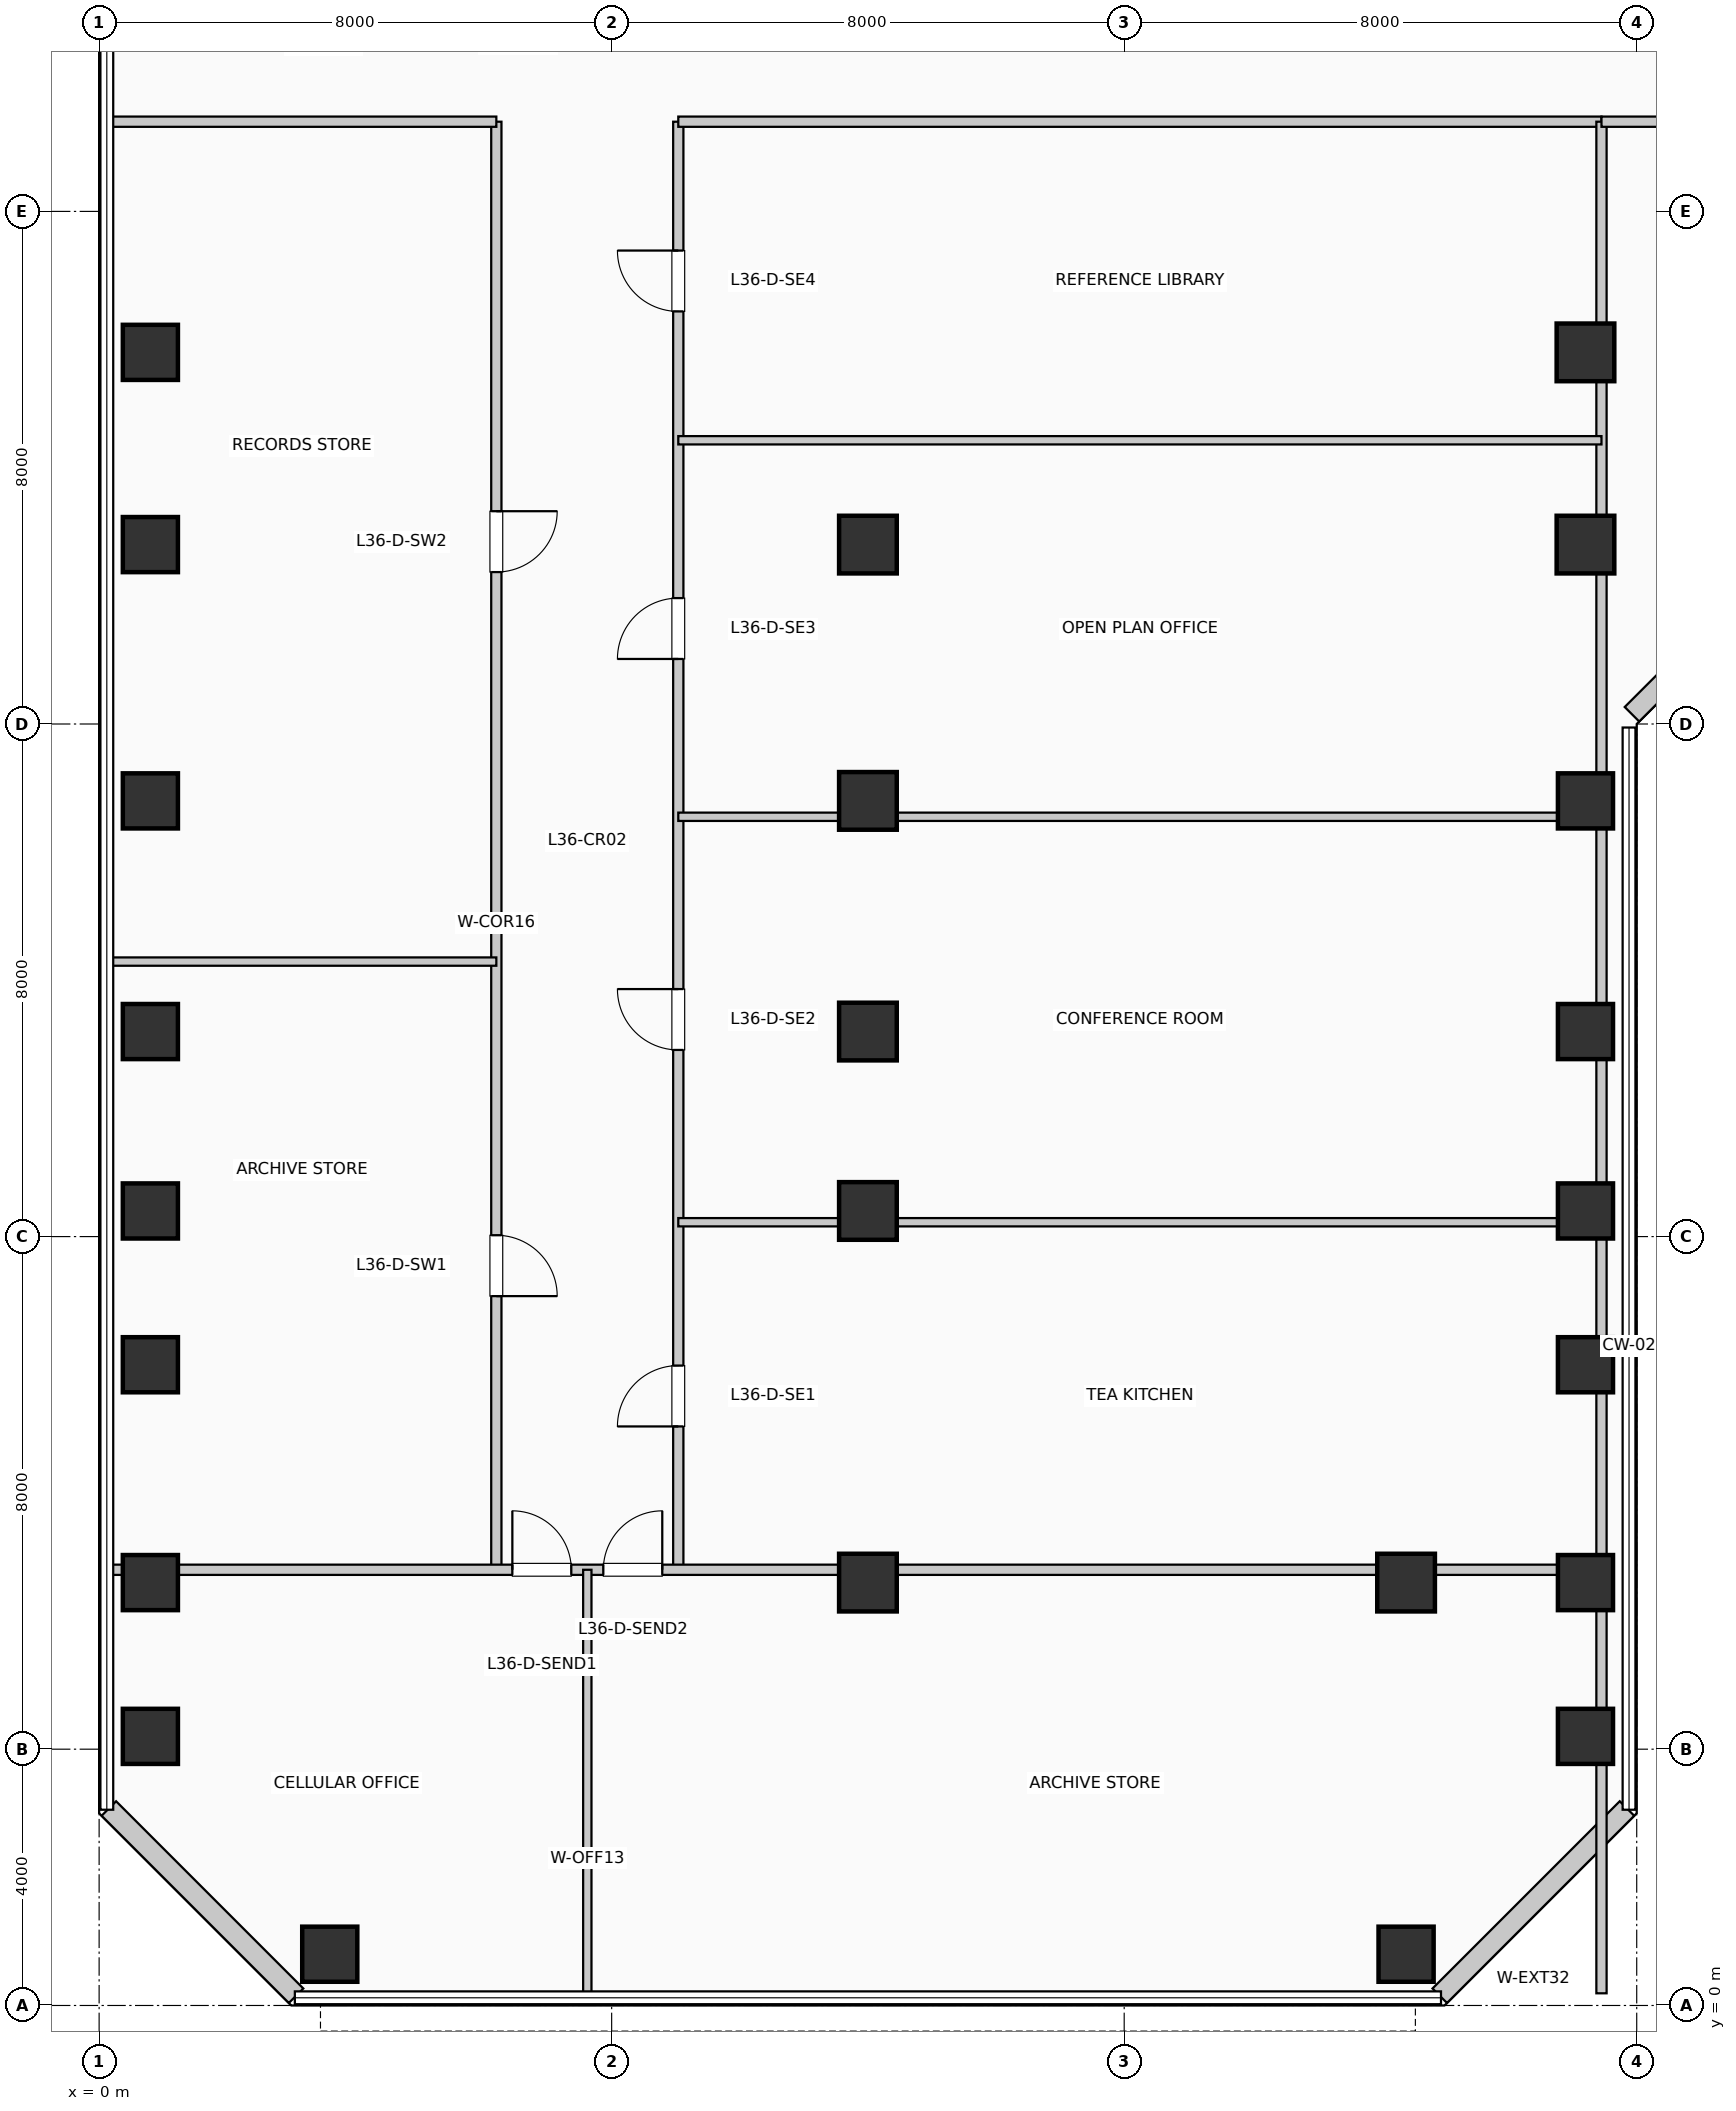
"""IFC4 building model, lengths in metres.
Left out: names, types, materials, properties, quantities, classifications, styles, units other than length and angle.
Written with IfcOpenShell. Run it as: python <this file> out.ifc"""

import sys

from ifc_helpers import new_model, si_unit, direction, frame, frame_2d, origin, origin_2d, place, context, subcontext, project, spatial, rectangle, extrude, element, fill, save


model = new_model("IFC4")
c1 = context("Model", 3, precision=1e-05, world=origin(), true_north=direction((0.0, 1.0)))
c2 = subcontext(c1, "Body", "Model", "MODEL_VIEW")
j1 = project(units=[si_unit("LENGTHUNIT", "METRE"), si_unit("PLANEANGLEUNIT", "RADIAN")], contexts=[c1])
p1 = place(None, origin())
s1 = spatial("IfcSite", under=j1, at=p1, CompositionType="ELEMENT")
p2 = place(p1, origin())
s2 = spatial("IfcBuilding", under=s1, at=p2, CompositionType="ELEMENT")
p3 = place(p2, frame((0.0, 0.0, 150.81)))
s3 = spatial("IfcBuildingStorey", under=s2, at=p3, CompositionType="ELEMENT", Elevation=150.81)
for number, where, z_axis, x_axis in (
    (1, (0.8, 4.2, 0.0), (0.0, 0.0, 1.0), (1.0, 0.0, 0.0)),
    (2, (0.8, 6.6, 0.0), (0.0, 0.0, 1.0), (1.0, 0.0, 0.0)),
    (3, (0.8, 10.0, 0.0), (0.0, 0.0, 1.0), (1.0, 0.0, 0.0)),
    (4, (0.8, 12.4, 0.0), (0.0, 0.0, 1.0), (1.0, 0.0, 0.0)),
    (5, (0.8, 15.2, 0.0), (0.0, 0.0, 1.0), (1.0, 0.0, 0.0)),
    (6, (0.8, 18.8, 0.0), (0.0, 0.0, 1.0), (1.0, 0.0, 0.0)),
    (7, (0.8, 22.8, 0.0), (0.0, 0.0, 1.0), (1.0, 0.0, 0.0)),
    (8, (0.8, 25.8, 0.0), (0.0, 0.0, 1.0), (1.0, 0.0, 0.0)),
    (9, (3.6, 0.8, 0.0), (0.0, 0.0, 1.0), (1.0, 0.0, 0.0)),
):
    element("IfcColumn", number, at=place(p3, frame(where, z_axis=z_axis, x_axis=x_axis)), inside=s3, PredefinedType="COLUMN", context=c2, shape_type="SweptSolid", body=[
        extrude(rectangle(XDim=0.86, YDim=0.86, at=origin_2d()), origin(), (0.0, 0.0, 1.0), 3.96),
    ])
for number, where, z_axis, x_axis in (
    (10, (12.0, 6.6, 0.0), (0.0, 0.0, 1.0), (1.0, 0.0, 0.0)),
    (11, (12.0, 12.4, 0.0), (0.0, 0.0, 1.0), (1.0, 0.0, 0.0)),
    (12, (12.0, 15.2, 0.0), (0.0, 0.0, 1.0), (1.0, 0.0, 0.0)),
    (13, (12.0, 18.8, 0.0), (0.0, 0.0, 1.0), (1.0, 0.0, 0.0)),
    (14, (12.0, 22.8, 0.0), (0.0, 0.0, 1.0), (1.0, 0.0, 0.0)),
):
    element("IfcColumn", number, at=place(p3, frame(where, z_axis=z_axis, x_axis=x_axis)), inside=s3, PredefinedType="COLUMN", context=c2, shape_type="SweptSolid", body=[
        extrude(rectangle(XDim=0.9, YDim=0.9, at=origin_2d()), origin(), (0.0, 0.0, 1.0), 3.96),
    ])
p4 = place(p3, frame((20.4, 0.8, 0.0), z_axis=(0.0, 0.0, 1.0), x_axis=(1.0, 0.0, 0.0)))
e15 = element("IfcColumn", 15, at=p4, inside=s3, PredefinedType="COLUMN", context=c2, shape_type="SweptSolid", body=[
    extrude(rectangle(XDim=0.86, YDim=0.86, at=origin_2d()), origin(), (0.0, 0.0, 1.0), 3.96),
])
p5 = place(p3, frame((20.4, 6.6, 0.0), z_axis=(0.0, 0.0, 1.0), x_axis=(1.0, 0.0, 0.0)))
e16 = element("IfcColumn", 16, at=p5, inside=s3, PredefinedType="COLUMN", context=c2, shape_type="SweptSolid", body=[
    extrude(rectangle(XDim=0.9, YDim=0.9, at=origin_2d()), origin(), (0.0, 0.0, 1.0), 3.96),
])
for number, where, z_axis, x_axis in (
    (17, (23.2, 4.2, 0.0), (0.0, 0.0, 1.0), (1.0, 0.0, 0.0)),
    (18, (23.2, 6.6, 0.0), (0.0, 0.0, 1.0), (1.0, 0.0, 0.0)),
    (19, (23.2, 10.0, 0.0), (0.0, 0.0, 1.0), (1.0, 0.0, 0.0)),
    (20, (23.2, 12.4, 0.0), (0.0, 0.0, 1.0), (1.0, 0.0, 0.0)),
    (21, (23.2, 15.2, 0.0), (0.0, 0.0, 1.0), (1.0, 0.0, 0.0)),
    (22, (23.2, 18.8, 0.0), (0.0, 0.0, 1.0), (1.0, 0.0, 0.0)),
):
    element("IfcColumn", number, at=place(p3, frame(where, z_axis=z_axis, x_axis=x_axis)), inside=s3, PredefinedType="COLUMN", context=c2, shape_type="SweptSolid", body=[
        extrude(rectangle(XDim=0.86, YDim=0.86, at=origin_2d()), origin(), (0.0, 0.0, 1.0), 3.96),
    ])
for number, where, z_axis, x_axis in (
    (23, (23.2, 22.8, 0.0), (0.0, 0.0, 1.0), (1.0, 0.0, 0.0)),
    (24, (23.2, 25.8, 0.0), (0.0, 0.0, 1.0), (1.0, 0.0, 0.0)),
):
    element("IfcColumn", number, at=place(p3, frame(where, z_axis=z_axis, x_axis=x_axis)), inside=s3, PredefinedType="COLUMN", context=c2, shape_type="SweptSolid", body=[
        extrude(rectangle(XDim=0.9, YDim=0.9, at=origin_2d()), origin(), (0.0, 0.0, 1.0), 3.96),
    ])
p6 = place(p3, frame((20.926, 0.152, 0.0), z_axis=(0.0, 0.0, 1.0), x_axis=(0.707106781187, 0.707106781187, 0.0)))
e25 = element("IfcWall", 25, at=p6, inside=s3, PredefinedType="SOLIDWALL", context=c2, shape_type="SweptSolid", body=[
    extrude(rectangle(XDim=4.133, YDim=0.32, at=frame_2d((2.066, 0.0))), origin(), (0.0, 0.0, 1.0), 3.71),
])
p7 = place(p3, frame((23.926, 20.152, 0.0), z_axis=(0.0, 0.0, 1.0), x_axis=(0.707106781187, 0.707106781187, 0.0)))
e26 = element("IfcWall", 26, at=p7, inside=s3, PredefinedType="SOLIDWALL", context=c2, shape_type="SweptSolid", body=[
    extrude(rectangle(XDim=2.718, YDim=0.32, at=frame_2d((1.359, 0.0))), origin(), (0.0, 0.0, 1.0), 3.71),
])
p8 = place(p3, frame((0.152, 3.074, 0.0), z_axis=(0.0, 0.0, 1.0), x_axis=(0.707106781187, -0.707106781187, 0.0)))
e27 = element("IfcWall", 27, at=p8, inside=s3, PredefinedType="SOLIDWALL", context=c2, shape_type="SweptSolid", body=[
    extrude(rectangle(XDim=4.133, YDim=0.32, at=frame_2d((2.066, 0.0))), origin(), (0.0, 0.0, 1.0), 3.71),
])
p9 = place(p3, frame((6.2, 6.8, 0.0), z_axis=(0.0, 0.0, 1.0), x_axis=(0.0, 1.0, 0.0)))
e28 = element("IfcWall", 28, at=p9, inside=s3, PredefinedType="PARTITIONING", context=c2, shape_type="SweptSolid", body=[
    extrude(rectangle(XDim=22.6, YDim=0.16, at=frame_2d((11.3, 0.0))), origin(), (0.0, 0.0, 1.0), 3.71),
])
p10 = place(p9, frame((5.221, 0.0, 0.0), z_axis=(0.0, 0.0, 1.0), x_axis=(-1.0, 0.0, 0.0)))
e29 = element("IfcOpeningElement", 29, at=p10, cuts=e28, PredefinedType="OPENING", context=c2, shape_type="SweptSolid", body=[
    extrude(rectangle(XDim=0.95, YDim=2.15, at=frame_2d((0.475, 1.075))), frame((0.0, 0.09, 0.0), z_axis=(0.0, -1.0, 0.0), x_axis=(1.0, 0.0, 0.0)), (0.0, 0.0, 1.0), 0.18),
])
p11 = place(p9, frame((16.521, 0.0, 0.0), z_axis=(0.0, 0.0, 1.0), x_axis=(-1.0, 0.0, 0.0)))
e30 = element("IfcOpeningElement", 30, at=p11, cuts=e28, PredefinedType="OPENING", context=c2, shape_type="SweptSolid", body=[
    extrude(rectangle(XDim=0.95, YDim=2.15, at=frame_2d((0.475, 1.075))), frame((0.0, 0.09, 0.0), z_axis=(0.0, -1.0, 0.0), x_axis=(1.0, 0.0, 0.0)), (0.0, 0.0, 1.0), 0.18),
])
p12 = place(p3, frame((9.04, 6.8, 0.0), z_axis=(0.0, 0.0, 1.0), x_axis=(0.0, 1.0, 0.0)))
e31 = element("IfcWall", 31, at=p12, inside=s3, PredefinedType="PARTITIONING", context=c2, shape_type="SweptSolid", body=[
    extrude(rectangle(XDim=22.6, YDim=0.16, at=frame_2d((11.3, 0.0))), origin(), (0.0, 0.0, 1.0), 3.71),
])
p13 = place(p12, frame((2.237, 0.0, 0.0)))
e32 = element("IfcOpeningElement", 32, at=p13, cuts=e31, PredefinedType="OPENING", context=c2, shape_type="SweptSolid", body=[
    extrude(rectangle(XDim=0.95, YDim=2.15, at=frame_2d((0.475, 1.075))), frame((0.0, 0.09, 0.0), z_axis=(0.0, -1.0, 0.0), x_axis=(1.0, 0.0, 0.0)), (0.0, 0.0, 1.0), 0.18),
])
p14 = place(p12, frame((8.113, 0.0, 0.0)))
e33 = element("IfcOpeningElement", 33, at=p14, cuts=e31, PredefinedType="OPENING", context=c2, shape_type="SweptSolid", body=[
    extrude(rectangle(XDim=0.95, YDim=2.15, at=frame_2d((0.475, 1.075))), frame((0.0, 0.09, 0.0), z_axis=(0.0, -1.0, 0.0), x_axis=(1.0, 0.0, 0.0)), (0.0, 0.0, 1.0), 0.18),
])
p15 = place(p12, frame((14.215, 0.0, 0.0)))
e34 = element("IfcOpeningElement", 34, at=p15, cuts=e31, PredefinedType="OPENING", context=c2, shape_type="SweptSolid", body=[
    extrude(rectangle(XDim=0.95, YDim=2.15, at=frame_2d((0.475, 1.075))), frame((0.0, 0.09, 0.0), z_axis=(0.0, -1.0, 0.0), x_axis=(1.0, 0.0, 0.0)), (0.0, 0.0, 1.0), 0.18),
])
p16 = place(p12, frame((19.639, 0.0, 0.0)))
e35 = element("IfcOpeningElement", 35, at=p16, cuts=e31, PredefinedType="OPENING", context=c2, shape_type="SweptSolid", body=[
    extrude(rectangle(XDim=0.95, YDim=2.15, at=frame_2d((0.475, 1.075))), frame((0.0, 0.09, 0.0), z_axis=(0.0, -1.0, 0.0), x_axis=(1.0, 0.0, 0.0)), (0.0, 0.0, 1.0), 0.18),
])
p17 = place(p3, frame((0.19, 6.8, 0.0), z_axis=(0.0, 0.0, 1.0), x_axis=(1.0, 0.0, 0.0)))
e36 = element("IfcWall", 36, at=p17, inside=s3, PredefinedType="PARTITIONING", context=c2, shape_type="SweptSolid", body=[
    extrude(rectangle(XDim=23.26, YDim=0.16, at=frame_2d((11.63, 0.0))), origin(), (0.0, 0.0, 1.0), 3.045),
])
p18 = place(p17, frame((6.26, 0.0, 0.0)))
e37 = element("IfcOpeningElement", 37, at=p18, cuts=e36, PredefinedType="OPENING", context=c2, shape_type="SweptSolid", body=[
    extrude(rectangle(XDim=0.92, YDim=2.1, at=frame_2d((0.46, 1.05))), frame((0.0, 0.09, 0.0), z_axis=(0.0, -1.0, 0.0), x_axis=(1.0, 0.0, 0.0)), (0.0, 0.0, 1.0), 0.18),
])
p19 = place(p17, frame((7.68, 0.0, 0.0)))
e38 = element("IfcOpeningElement", 38, at=p19, cuts=e36, PredefinedType="OPENING", context=c2, shape_type="SweptSolid", body=[
    extrude(rectangle(XDim=0.92, YDim=2.1, at=frame_2d((0.46, 1.05))), frame((0.0, 0.09, 0.0), z_axis=(0.0, -1.0, 0.0), x_axis=(1.0, 0.0, 0.0)), (0.0, 0.0, 1.0), 0.18),
])
p20 = place(p3, frame((0.19, 29.4, 0.0), z_axis=(0.0, 0.0, 1.0), x_axis=(1.0, 0.0, 0.0)))
e39 = element("IfcWall", 39, at=p20, inside=s3, PredefinedType="PARTITIONING", context=c2, shape_type="SweptSolid", body=[
    extrude(rectangle(XDim=6.01, YDim=0.16, at=frame_2d((3.005, 0.0))), origin(), (0.0, 0.0, 1.0), 3.365),
])
p21 = place(p3, frame((9.04, 29.4, 0.0), z_axis=(0.0, 0.0, 1.0), x_axis=(1.0, 0.0, 0.0)))
e40 = element("IfcWall", 40, at=p21, inside=s3, PredefinedType="PARTITIONING", context=c2, shape_type="SweptSolid", body=[
    extrude(rectangle(XDim=14.41, YDim=0.16, at=frame_2d((7.205, 0.0))), origin(), (0.0, 0.0, 1.0), 3.365),
])
p22 = place(p3, frame((23.45, 0.19, 0.0), z_axis=(0.0, 0.0, 1.0), x_axis=(0.0, 1.0, 0.0)))
e41 = element("IfcWall", 41, at=p22, inside=s3, PredefinedType="PARTITIONING", context=c2, shape_type="SweptSolid", body=[
    extrude(rectangle(XDim=29.21, YDim=0.16, at=frame_2d((14.605, 0.0))), origin(), (0.0, 0.0, 1.0), 3.045),
])
p23 = place(p3, frame((7.62, 0.19, 0.0), z_axis=(0.0, 0.0, 1.0), x_axis=(0.0, 1.0, 0.0)))
e42 = element("IfcWall", 42, at=p23, inside=s3, PredefinedType="PARTITIONING", context=c2, shape_type="SweptSolid", body=[
    extrude(rectangle(XDim=6.61, YDim=0.13, at=frame_2d((3.305, 0.0))), origin(), (0.0, 0.0, 1.0), 3.71),
])
p24 = place(p3, frame((0.19, 16.292, 0.0), z_axis=(0.0, 0.0, 1.0), x_axis=(1.0, 0.0, 0.0)))
e43 = element("IfcWall", 43, at=p24, inside=s3, PredefinedType="PARTITIONING", context=c2, shape_type="SweptSolid", body=[
    extrude(rectangle(XDim=6.01, YDim=0.13, at=frame_2d((3.005, 0.0))), origin(), (0.0, 0.0, 1.0), 3.71),
])
for number, where, z_axis, x_axis in (
    (44, (9.04, 12.224, 0.0), (0.0, 0.0, 1.0), (1.0, 0.0, 0.0)),
    (45, (9.04, 18.552, 0.0), (0.0, 0.0, 1.0), (1.0, 0.0, 0.0)),
):
    element("IfcWall", number, at=place(p3, frame(where, z_axis=z_axis, x_axis=x_axis)), inside=s3, PredefinedType="PARTITIONING", context=c2, shape_type="SweptSolid", body=[
        extrude(rectangle(XDim=14.41, YDim=0.13, at=frame_2d((7.205, 0.0))), origin(), (0.0, 0.0, 1.0), 3.045),
    ])
p25 = place(p3, frame((9.04, 24.428, 0.0), z_axis=(0.0, 0.0, 1.0), x_axis=(1.0, 0.0, 0.0)))
e46 = element("IfcWall", 46, at=p25, inside=s3, PredefinedType="PARTITIONING", context=c2, shape_type="SweptSolid", body=[
    extrude(rectangle(XDim=14.41, YDim=0.13, at=frame_2d((7.205, 0.0))), origin(), (0.0, 0.0, 1.0), 3.71),
])
p26 = place(p3, frame((23.45, 29.4, 0.0), z_axis=(0.0, 0.0, 1.0), x_axis=(1.0, 0.0, 0.0)))
e47 = element("IfcWall", 47, at=p26, inside=s3, PredefinedType="PARTITIONING", context=c2, shape_type="SweptSolid", body=[
    extrude(rectangle(XDim=26.56, YDim=0.16, at=frame_2d((13.28, 0.0))), origin(), (0.0, 0.0, 1.0), 3.365),
])
p27 = place(p26, frame((4.725, 0.0, 0.0), z_axis=(0.0, 0.0, 1.0), x_axis=(-1.0, 0.0, 0.0)))
e48 = element("IfcOpeningElement", 48, at=p27, cuts=e47, PredefinedType="OPENING", context=c2, shape_type="SweptSolid", body=[
    extrude(rectangle(XDim=0.95, YDim=2.15, at=frame_2d((0.475, 1.075))), frame((0.0, 0.09, 0.0), z_axis=(0.0, -1.0, 0.0), x_axis=(1.0, 0.0, 0.0)), (0.0, 0.0, 1.0), 0.18),
])
p28 = place(p26, frame((13.755, 0.0, 0.0), z_axis=(0.0, 0.0, 1.0), x_axis=(-1.0, 0.0, 0.0)))
e49 = element("IfcOpeningElement", 49, at=p28, cuts=e47, PredefinedType="OPENING", context=c2, shape_type="SweptSolid", body=[
    extrude(rectangle(XDim=0.95, YDim=2.15, at=frame_2d((0.475, 1.075))), frame((0.0, 0.09, 0.0), z_axis=(0.0, -1.0, 0.0), x_axis=(1.0, 0.0, 0.0)), (0.0, 0.0, 1.0), 0.18),
])
p29 = place(p26, frame((22.785, 0.0, 0.0), z_axis=(0.0, 0.0, 1.0), x_axis=(-1.0, 0.0, 0.0)))
e50 = element("IfcOpeningElement", 50, at=p29, cuts=e47, PredefinedType="OPENING", context=c2, shape_type="SweptSolid", body=[
    extrude(rectangle(XDim=0.95, YDim=2.15, at=frame_2d((0.475, 1.075))), frame((0.0, 0.09, 0.0), z_axis=(0.0, -1.0, 0.0), x_axis=(1.0, 0.0, 0.0)), (0.0, 0.0, 1.0), 0.18),
])
p30 = place(p18, origin())
e51 = element("IfcDoor", 51, at=p30, inside=s3, OperationType="SINGLE_SWING_LEFT", PredefinedType="DOOR", context=c2, shape_type="SweptSolid", body=[
    extrude(rectangle(XDim=0.92, YDim=2.1, at=frame_2d((0.46, 1.05))), frame((0.0, 0.025, 0.0), z_axis=(0.0, -1.0, 0.0), x_axis=(1.0, 0.0, 0.0)), (0.0, 0.0, 1.0), 0.05),
])
fill(e37, e51)
p31 = place(p19, origin())
e52 = element("IfcDoor", 52, at=p31, inside=s3, OperationType="SINGLE_SWING_RIGHT", PredefinedType="DOOR", context=c2, shape_type="SweptSolid", body=[
    extrude(rectangle(XDim=0.92, YDim=2.1, at=frame_2d((0.46, 1.05))), frame((0.0, 0.025, 0.0), z_axis=(0.0, -1.0, 0.0), x_axis=(1.0, 0.0, 0.0)), (0.0, 0.0, 1.0), 0.05),
])
fill(e38, e52)
p32 = place(p10, origin())
e53 = element("IfcDoor", 53, at=p32, inside=s3, OperationType="SINGLE_SWING_LEFT", PredefinedType="DOOR", context=c2, shape_type="SweptSolid", body=[
    extrude(rectangle(XDim=0.95, YDim=2.15, at=frame_2d((0.475, 1.075))), frame((0.0, 0.025, 0.0), z_axis=(0.0, -1.0, 0.0), x_axis=(1.0, 0.0, 0.0)), (0.0, 0.0, 1.0), 0.05),
])
fill(e29, e53)
p33 = place(p11, origin())
e54 = element("IfcDoor", 54, at=p33, inside=s3, OperationType="SINGLE_SWING_RIGHT", PredefinedType="DOOR", context=c2, shape_type="SweptSolid", body=[
    extrude(rectangle(XDim=0.95, YDim=2.15, at=frame_2d((0.475, 1.075))), frame((0.0, 0.025, 0.0), z_axis=(0.0, -1.0, 0.0), x_axis=(1.0, 0.0, 0.0)), (0.0, 0.0, 1.0), 0.05),
])
fill(e30, e54)
p34 = place(p13, origin())
e55 = element("IfcDoor", 55, at=p34, inside=s3, OperationType="SINGLE_SWING_LEFT", PredefinedType="DOOR", context=c2, shape_type="SweptSolid", body=[
    extrude(rectangle(XDim=0.95, YDim=2.15, at=frame_2d((0.475, 1.075))), frame((0.0, 0.025, 0.0), z_axis=(0.0, -1.0, 0.0), x_axis=(1.0, 0.0, 0.0)), (0.0, 0.0, 1.0), 0.05),
])
fill(e32, e55)
p35 = place(p14, origin())
e56 = element("IfcDoor", 56, at=p35, inside=s3, OperationType="SINGLE_SWING_RIGHT", PredefinedType="DOOR", context=c2, shape_type="SweptSolid", body=[
    extrude(rectangle(XDim=0.95, YDim=2.15, at=frame_2d((0.475, 1.075))), frame((0.0, 0.025, 0.0), z_axis=(0.0, -1.0, 0.0), x_axis=(1.0, 0.0, 0.0)), (0.0, 0.0, 1.0), 0.05),
])
fill(e33, e56)
p36 = place(p15, origin())
e57 = element("IfcDoor", 57, at=p36, inside=s3, OperationType="SINGLE_SWING_LEFT", PredefinedType="DOOR", context=c2, shape_type="SweptSolid", body=[
    extrude(rectangle(XDim=0.95, YDim=2.15, at=frame_2d((0.475, 1.075))), frame((0.0, 0.025, 0.0), z_axis=(0.0, -1.0, 0.0), x_axis=(1.0, 0.0, 0.0)), (0.0, 0.0, 1.0), 0.05),
])
fill(e34, e57)
p37 = place(p16, origin())
e58 = element("IfcDoor", 58, at=p37, inside=s3, OperationType="SINGLE_SWING_RIGHT", PredefinedType="DOOR", context=c2, shape_type="SweptSolid", body=[
    extrude(rectangle(XDim=0.95, YDim=2.15, at=frame_2d((0.475, 1.075))), frame((0.0, 0.025, 0.0), z_axis=(0.0, -1.0, 0.0), x_axis=(1.0, 0.0, 0.0)), (0.0, 0.0, 1.0), 0.05),
])
fill(e35, e58)
save(model, sys.argv[1])
